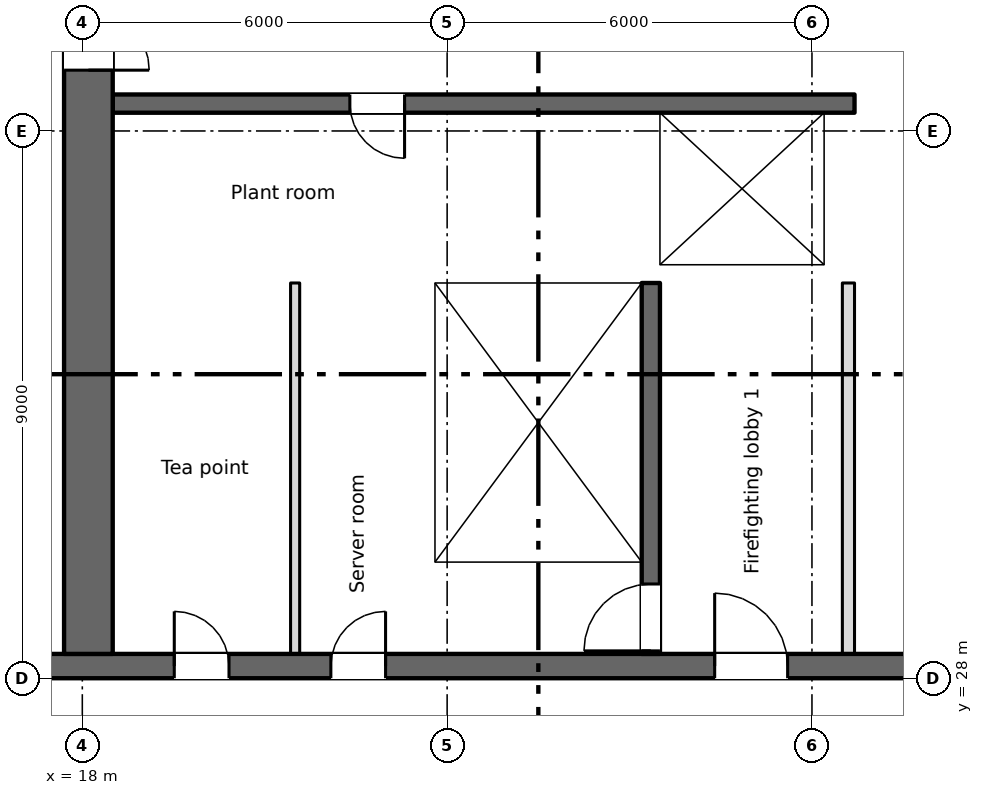
"""IFC4 building model, lengths in metres.
Left out: names, types, materials, properties, quantities, classifications, styles, units other than length and angle.
Written with IfcOpenShell. Run it as: python <this file> out.ifc"""

import sys

from ifc_helpers import new_model, si_unit, direction, frame, frame_2d, origin, place, context, subcontext, project, spatial, rectangle, extrude, element, fill, save


model = new_model("IFC4")
c1 = context("Model", 3, precision=1e-05, world=origin(), true_north=direction((0.0, 1.0)))
c2 = subcontext(c1, "Body", "Model", "MODEL_VIEW")
j1 = project(units=[si_unit("LENGTHUNIT", "METRE"), si_unit("PLANEANGLEUNIT", "RADIAN")], contexts=[c1])
p1 = place(None, origin())
s1 = spatial("IfcSite", under=j1, at=p1, CompositionType="ELEMENT")
p2 = place(p1, origin())
s2 = spatial("IfcBuilding", under=s1, at=p2, CompositionType="ELEMENT")
p3 = place(p2, frame((0.0, 0.0, 136.25)))
s3 = spatial("IfcBuildingStorey", under=s2, at=p3, CompositionType="ELEMENT", Elevation=136.25)
p4 = place(p3, frame((6.7, 28.2, 0.0), z_axis=(0.0, 0.0, 1.0), x_axis=(1.0, 0.0, 0.0)))
e1 = element("IfcWall", 1, at=p4, inside=s3, PredefinedType="SHEAR", context=c2, shape_type="SweptSolid", body=[
    extrude(rectangle(XDim=57.8, YDim=0.4, at=frame_2d((28.9, 0.0))), origin(), (0.0, 0.0, 1.0), 3.35),
])
p5 = place(p4, frame((12.812, 0.0, 0.0)))
e2 = element("IfcOpeningElement", 2, at=p5, cuts=e1, PredefinedType="OPENING", context=c2, shape_type="SweptSolid", body=[
    extrude(rectangle(XDim=0.9, YDim=2.1, at=frame_2d((0.45, 1.05))), frame((0.0, 0.21, 0.0), z_axis=(0.0, -1.0, 0.0), x_axis=(1.0, 0.0, 0.0)), (0.0, 0.0, 1.0), 0.42),
])
p6 = place(p4, frame((15.387, 0.0, 0.0)))
e3 = element("IfcOpeningElement", 3, at=p6, cuts=e1, PredefinedType="OPENING", context=c2, shape_type="SweptSolid", body=[
    extrude(rectangle(XDim=0.9, YDim=2.1, at=frame_2d((0.45, 1.05))), frame((0.0, 0.21, 0.0), z_axis=(0.0, -1.0, 0.0), x_axis=(1.0, 0.0, 0.0)), (0.0, 0.0, 1.0), 0.42),
])
p7 = place(p4, frame((48.312, 0.0, 0.0)))
e4 = element("IfcOpeningElement", 4, at=p7, cuts=e1, PredefinedType="OPENING", context=c2, shape_type="SweptSolid", body=[
    extrude(rectangle(XDim=0.9, YDim=2.1, at=frame_2d((0.45, 1.05))), frame((0.0, 0.21, 0.0), z_axis=(0.0, -1.0, 0.0), x_axis=(1.0, 0.0, 0.0)), (0.0, 0.0, 1.0), 0.42),
])
p8 = place(p4, frame((50.887, 0.0, 0.0)))
e5 = element("IfcOpeningElement", 5, at=p8, cuts=e1, PredefinedType="OPENING", context=c2, shape_type="SweptSolid", body=[
    extrude(rectangle(XDim=0.9, YDim=2.1, at=frame_2d((0.45, 1.05))), frame((0.0, 0.21, 0.0), z_axis=(0.0, -1.0, 0.0), x_axis=(1.0, 0.0, 0.0)), (0.0, 0.0, 1.0), 0.42),
])
p9 = place(p4, frame((0.562, 0.0, 0.0)))
e6 = element("IfcOpeningElement", 6, at=p9, cuts=e1, PredefinedType="OPENING", context=c2, shape_type="SweptSolid", body=[
    extrude(rectangle(XDim=0.9, YDim=2.1, at=frame_2d((0.45, 1.05))), frame((0.0, 0.21, 0.0), z_axis=(0.0, -1.0, 0.0), x_axis=(1.0, 0.0, 0.0)), (0.0, 0.0, 1.0), 0.42),
])
p10 = place(p4, frame((2.137, 0.0, 0.0)))
e7 = element("IfcOpeningElement", 7, at=p10, cuts=e1, PredefinedType="OPENING", context=c2, shape_type="SweptSolid", body=[
    extrude(rectangle(XDim=0.9, YDim=2.1, at=frame_2d((0.45, 1.05))), frame((0.0, 0.21, 0.0), z_axis=(0.0, -1.0, 0.0), x_axis=(1.0, 0.0, 0.0)), (0.0, 0.0, 1.0), 0.42),
])
p11 = place(p4, frame((4.7, 0.0, 0.0)))
e8 = element("IfcOpeningElement", 8, at=p11, cuts=e1, PredefinedType="OPENING", context=c2, shape_type="SweptSolid", body=[
    extrude(rectangle(XDim=1.2, YDim=2.1, at=frame_2d((0.6, 1.05))), frame((0.0, 0.21, 0.0), z_axis=(0.0, -1.0, 0.0), x_axis=(1.0, 0.0, 0.0)), (0.0, 0.0, 1.0), 0.42),
])
p12 = place(p4, frame((31.7, 0.0, 0.0)))
e9 = element("IfcOpeningElement", 9, at=p12, cuts=e1, PredefinedType="OPENING", context=c2, shape_type="SweptSolid", body=[
    extrude(rectangle(XDim=1.2, YDim=2.1, at=frame_2d((0.6, 1.05))), frame((0.0, 0.21, 0.0), z_axis=(0.0, -1.0, 0.0), x_axis=(1.0, 0.0, 0.0)), (0.0, 0.0, 1.0), 0.42),
])
p13 = place(p4, frame((55.2, 0.0, 0.0)))
e10 = element("IfcOpeningElement", 10, at=p13, cuts=e1, PredefinedType="OPENING", context=c2, shape_type="SweptSolid", body=[
    extrude(rectangle(XDim=1.2, YDim=2.1, at=frame_2d((0.6, 1.05))), frame((0.0, 0.21, 0.0), z_axis=(0.0, -1.0, 0.0), x_axis=(1.0, 0.0, 0.0)), (0.0, 0.0, 1.0), 0.42),
])
p14 = place(p4, frame((21.7, 0.0, 0.0)))
e11 = element("IfcOpeningElement", 11, at=p14, cuts=e1, PredefinedType="OPENING", context=c2, shape_type="SweptSolid", body=[
    extrude(rectangle(XDim=1.2, YDim=2.1, at=frame_2d((0.6, 1.05))), frame((0.0, 0.21, 0.0), z_axis=(0.0, -1.0, 0.0), x_axis=(1.0, 0.0, 0.0)), (0.0, 0.0, 1.0), 0.42),
])
p15 = place(p4, frame((41.7, 0.0, 0.0)))
e12 = element("IfcOpeningElement", 12, at=p15, cuts=e1, PredefinedType="OPENING", context=c2, shape_type="SweptSolid", body=[
    extrude(rectangle(XDim=1.2, YDim=2.1, at=frame_2d((0.6, 1.05))), frame((0.0, 0.21, 0.0), z_axis=(0.0, -1.0, 0.0), x_axis=(1.0, 0.0, 0.0)), (0.0, 0.0, 1.0), 0.42),
])
p16 = place(p4, frame((24.85, 0.0, 0.0)))
e13 = element("IfcOpeningElement", 13, at=p16, cuts=e1, PredefinedType="OPENING", context=c2, shape_type="SweptSolid", body=[
    extrude(rectangle(XDim=2.4, YDim=2.1, at=frame_2d((1.2, 1.05))), frame((0.0, 0.21, 0.0), z_axis=(0.0, -1.0, 0.0), x_axis=(1.0, 0.0, 0.0)), (0.0, 0.0, 1.0), 0.42),
])
p17 = place(p4, frame((37.35, 0.0, 0.0)))
e14 = element("IfcOpeningElement", 14, at=p17, cuts=e1, PredefinedType="OPENING", context=c2, shape_type="SweptSolid", body=[
    extrude(rectangle(XDim=2.4, YDim=2.1, at=frame_2d((1.2, 1.05))), frame((0.0, 0.21, 0.0), z_axis=(0.0, -1.0, 0.0), x_axis=(1.0, 0.0, 0.0)), (0.0, 0.0, 1.0), 0.42),
])
p18 = place(p4, frame((7.95, 0.0, 0.0)))
e15 = element("IfcOpeningElement", 15, at=p18, cuts=e1, PredefinedType="OPENING", context=c2, shape_type="SweptSolid", body=[
    extrude(rectangle(XDim=2.4, YDim=2.1, at=frame_2d((1.2, 1.05))), frame((0.0, 0.21, 0.0), z_axis=(0.0, -1.0, 0.0), x_axis=(1.0, 0.0, 0.0)), (0.0, 0.0, 1.0), 0.42),
])
p19 = place(p4, frame((28.85, 0.0, 0.0)))
e16 = element("IfcOpeningElement", 16, at=p19, cuts=e1, PredefinedType="OPENING", context=c2, shape_type="SweptSolid", body=[
    extrude(rectangle(XDim=0.9, YDim=2.1, at=frame_2d((0.45, 1.05))), frame((0.0, 0.21, 0.0), z_axis=(0.0, -1.0, 0.0), x_axis=(1.0, 0.0, 0.0)), (0.0, 0.0, 1.0), 0.42),
])
p20 = place(p4, frame((34.85, 0.0, 0.0)))
e17 = element("IfcOpeningElement", 17, at=p20, cuts=e1, PredefinedType="OPENING", context=c2, shape_type="SweptSolid", body=[
    extrude(rectangle(XDim=0.9, YDim=2.1, at=frame_2d((0.45, 1.05))), frame((0.0, 0.21, 0.0), z_axis=(0.0, -1.0, 0.0), x_axis=(1.0, 0.0, 0.0)), (0.0, 0.0, 1.0), 0.42),
])
p21 = place(p3, frame((18.1, 28.4, 0.0), z_axis=(0.0, 0.0, 1.0), x_axis=(0.0, 1.0, 0.0)))
e18 = element("IfcWall", 18, at=p21, inside=s3, PredefinedType="SHEAR", context=c2, shape_type="SweptSolid", body=[
    extrude(rectangle(XDim=16.8, YDim=0.8, at=frame_2d((8.4, 0.0))), origin(), (0.0, 0.0, 1.0), 3.35),
])
p22 = place(p21, frame((9.6, 0.0, 0.0)))
e19 = element("IfcOpeningElement", 19, at=p22, cuts=e18, PredefinedType="OPENING", context=c2, shape_type="SweptSolid", body=[
    extrude(rectangle(XDim=2.0, YDim=2.1, at=frame_2d((1.0, 1.05))), frame((0.0, 0.41, 0.0), z_axis=(0.0, -1.0, 0.0), x_axis=(1.0, 0.0, 0.0)), (0.0, 0.0, 1.0), 0.82),
])
p23 = place(p21, frame((15.35, 0.0, 0.0)))
e20 = element("IfcOpeningElement", 20, at=p23, cuts=e18, PredefinedType="OPENING", context=c2, shape_type="SweptSolid", body=[
    extrude(rectangle(XDim=1.2, YDim=2.1, at=frame_2d((0.6, 1.05))), frame((0.0, 0.41, 0.0), z_axis=(0.0, -1.0, 0.0), x_axis=(1.0, 0.0, 0.0)), (0.0, 0.0, 1.0), 0.82),
])
p24 = place(p3, frame((23.65, 28.4, 0.0), z_axis=(0.0, 0.0, 1.0), x_axis=(0.0, 1.0, 0.0)))
e21 = element("IfcWall", 21, at=p24, inside=s3, PredefinedType="SHEAR", context=c2, shape_type="SweptSolid", body=[
    extrude(rectangle(XDim=6.1, YDim=0.3, at=frame_2d((3.05, 0.0))), origin(), (0.0, 0.0, 1.0), 3.35),
])
p25 = place(p3, frame((27.35, 28.4, 0.0), z_axis=(0.0, 0.0, 1.0), x_axis=(0.0, 1.0, 0.0)))
e22 = element("IfcWall", 22, at=p25, inside=s3, PredefinedType="SHEAR", context=c2, shape_type="SweptSolid", body=[
    extrude(rectangle(XDim=6.1, YDim=0.3, at=frame_2d((3.05, 0.0))), origin(), (0.0, 0.0, 1.0), 3.35),
])
p26 = place(p25, frame((0.05, 0.0, 0.0)))
e23 = element("IfcOpeningElement", 23, at=p26, cuts=e22, PredefinedType="OPENING", context=c2, shape_type="SweptSolid", body=[
    extrude(rectangle(XDim=1.1, YDim=2.1, at=frame_2d((0.55, 1.05))), frame((0.0, 0.16, 0.0), z_axis=(0.0, -1.0, 0.0), x_axis=(1.0, 0.0, 0.0)), (0.0, 0.0, 1.0), 0.32),
])
p27 = place(p3, frame((18.5, 34.65, 0.0), z_axis=(0.0, 0.0, 1.0), x_axis=(1.0, 0.0, 0.0)))
e24 = element("IfcWall", 24, at=p27, inside=s3, PredefinedType="SHEAR", context=c2, shape_type="SweptSolid", body=[
    extrude(rectangle(XDim=12.2, YDim=0.3, at=frame_2d((6.1, 0.0))), origin(), (0.0, 0.0, 1.0), 3.35),
])
p28 = place(p27, frame((9.8, 0.0, 0.0)))
e25 = element("IfcOpeningElement", 25, at=p28, cuts=e24, PredefinedType="OPENING", context=c2, shape_type="SweptSolid", body=[
    extrude(rectangle(XDim=1.1, YDim=2.1, at=frame_2d((0.55, 1.05))), frame((0.0, 0.16, 0.0), z_axis=(0.0, -1.0, 0.0), x_axis=(1.0, 0.0, 0.0)), (0.0, 0.0, 1.0), 0.32),
])
p29 = place(p3, frame((30.7, 37.45, 0.0), z_axis=(0.0, 0.0, 1.0), x_axis=(-1.0, 0.0, 0.0)))
e26 = element("IfcWall", 26, at=p29, inside=s3, PredefinedType="SHEAR", context=c2, shape_type="SweptSolid", body=[
    extrude(rectangle(XDim=12.2, YDim=0.3, at=frame_2d((6.1, 0.0))), origin(), (0.0, 0.0, 1.0), 3.35),
])
p30 = place(p29, frame((7.4, 0.0, 0.0)))
e27 = element("IfcOpeningElement", 27, at=p30, cuts=e26, PredefinedType="OPENING", context=c2, shape_type="SweptSolid", body=[
    extrude(rectangle(XDim=0.9, YDim=2.1, at=frame_2d((0.45, 1.05))), frame((0.0, 0.16, 0.0), z_axis=(0.0, -1.0, 0.0), x_axis=(1.0, 0.0, 0.0)), (0.0, 0.0, 1.0), 0.32),
])
p31 = place(p3, frame((27.35, 34.8, 0.0), z_axis=(0.0, 0.0, 1.0), x_axis=(0.0, 1.0, 0.0)))
e28 = element("IfcWall", 28, at=p31, inside=s3, PredefinedType="SHEAR", context=c2, shape_type="SweptSolid", body=[
    extrude(rectangle(XDim=2.5, YDim=0.3, at=frame_2d((1.25, 0.0))), origin(), (0.0, 0.0, 1.0), 3.35),
])
p32 = place(p3, frame((30.45, 34.8, 0.0), z_axis=(0.0, 0.0, 1.0), x_axis=(0.0, 1.0, 0.0)))
e29 = element("IfcWall", 29, at=p32, inside=s3, PredefinedType="SHEAR", context=c2, shape_type="SweptSolid", body=[
    extrude(rectangle(XDim=2.5, YDim=0.5, at=frame_2d((1.25, 0.0))), origin(), (0.0, 0.0, 1.0), 3.35),
])
p33 = place(p3, frame((30.6, 28.4, 0.0), z_axis=(0.0, 0.0, 1.0), x_axis=(0.0, 1.0, 0.0)))
e30 = element("IfcWall", 30, at=p33, inside=s3, PredefinedType="PARTITIONING", context=c2, shape_type="SweptSolid", body=[
    extrude(rectangle(XDim=6.1, YDim=0.2, at=frame_2d((3.05, 0.0))), origin(), (0.0, 0.0, 1.0), 3.35),
])
p34 = place(p3, frame((21.5, 28.4, 0.0), z_axis=(0.0, 0.0, 1.0), x_axis=(0.0, 1.0, 0.0)))
e31 = element("IfcWall", 31, at=p34, inside=s3, PredefinedType="PARTITIONING", context=c2, shape_type="SweptSolid", body=[
    extrude(rectangle(XDim=6.1, YDim=0.15, at=frame_2d((3.05, 0.0))), origin(), (0.0, 0.0, 1.0), 3.35),
])
p35 = place(p5, origin())
e32 = element("IfcDoor", 32, at=p35, inside=s3, OperationType="SINGLE_SWING_LEFT", PredefinedType="DOOR", context=c2, shape_type="SweptSolid", body=[
    extrude(rectangle(XDim=0.9, YDim=2.1, at=frame_2d((0.45, 1.05))), frame((0.0, 0.025, 0.0), z_axis=(0.0, -1.0, 0.0), x_axis=(1.0, 0.0, 0.0)), (0.0, 0.0, 1.0), 0.05),
])
fill(e2, e32)
p36 = place(p6, origin())
e33 = element("IfcDoor", 33, at=p36, inside=s3, OperationType="SINGLE_SWING_RIGHT", PredefinedType="DOOR", context=c2, shape_type="SweptSolid", body=[
    extrude(rectangle(XDim=0.9, YDim=2.1, at=frame_2d((0.45, 1.05))), frame((0.0, 0.025, 0.0), z_axis=(0.0, -1.0, 0.0), x_axis=(1.0, 0.0, 0.0)), (0.0, 0.0, 1.0), 0.05),
])
fill(e3, e33)
p37 = place(p30, origin())
e34 = element("IfcDoor", 34, at=p37, inside=s3, OperationType="SINGLE_SWING_LEFT", PredefinedType="DOOR", context=c2, shape_type="SweptSolid", body=[
    extrude(rectangle(XDim=0.9, YDim=2.1, at=frame_2d((0.45, 1.05))), frame((0.0, 0.025, 0.0), z_axis=(0.0, -1.0, 0.0), x_axis=(1.0, 0.0, 0.0)), (0.0, 0.0, 1.0), 0.05),
])
fill(e27, e34)
p38 = place(p28, origin())
e35 = element("IfcDoor", 35, at=p38, inside=s3, OperationType="SLIDING_TO_LEFT", PredefinedType="DOOR", context=c2, shape_type="SweptSolid", body=[
    extrude(rectangle(XDim=1.1, YDim=2.1, at=frame_2d((0.55, 1.05))), frame((0.0, 0.025, 0.0), z_axis=(0.0, -1.0, 0.0), x_axis=(1.0, 0.0, 0.0)), (0.0, 0.0, 1.0), 0.05),
])
fill(e25, e35)
p39 = place(p26, origin())
e36 = element("IfcDoor", 36, at=p39, inside=s3, OperationType="SINGLE_SWING_LEFT", PredefinedType="DOOR", context=c2, shape_type="SweptSolid", body=[
    extrude(rectangle(XDim=1.1, YDim=2.1, at=frame_2d((0.55, 1.05))), frame((0.0, 0.025, 0.0), z_axis=(0.0, -1.0, 0.0), x_axis=(1.0, 0.0, 0.0)), (0.0, 0.0, 1.0), 0.05),
])
fill(e23, e36)
p40 = place(p14, origin())
e37 = element("IfcDoor", 37, at=p40, inside=s3, OperationType="SINGLE_SWING_LEFT", PredefinedType="DOOR", context=c2, shape_type="SweptSolid", body=[
    extrude(rectangle(XDim=1.2, YDim=2.1, at=frame_2d((0.6, 1.05))), frame((0.0, 0.025, 0.0), z_axis=(0.0, -1.0, 0.0), x_axis=(1.0, 0.0, 0.0)), (0.0, 0.0, 1.0), 0.05),
])
fill(e11, e37)
p41 = place(p22, origin())
e38 = element("IfcDoor", 38, at=p41, inside=s3, OperationType="DOUBLE_DOOR_SINGLE_SWING", PredefinedType="DOOR", context=c2, shape_type="SweptSolid", body=[
    extrude(rectangle(XDim=2.0, YDim=2.1, at=frame_2d((1.0, 1.05))), frame((0.0, 0.025, 0.0), z_axis=(0.0, -1.0, 0.0), x_axis=(1.0, 0.0, 0.0)), (0.0, 0.0, 1.0), 0.05),
])
fill(e19, e38)
save(model, sys.argv[1])
